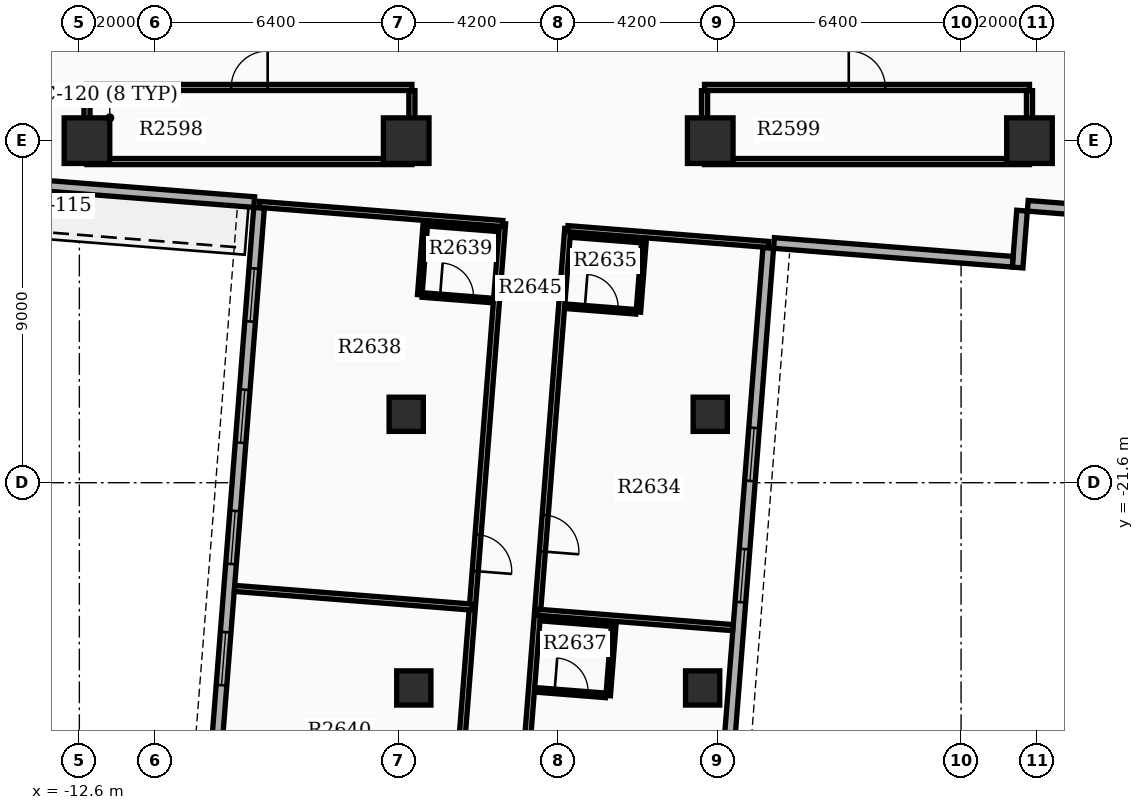
"""IFC4 building model, lengths in metres.
Left out: names, types, materials, properties, quantities, classifications, styles, units other than length and angle.
Written with IfcOpenShell. Run it as: python <this file> out.ifc"""

import sys

from ifc_helpers import new_model, si_unit, direction, frame, frame_2d, origin, origin_2d, place, context, subcontext, project, spatial, rectangle, extrude, element, fill, save


model = new_model("IFC4")
c1 = context("Model", 3, precision=1e-05, world=origin(), true_north=direction((0.0, 1.0)))
c2 = subcontext(c1, "Body", "Model", "MODEL_VIEW")
j1 = project(units=[si_unit("LENGTHUNIT", "METRE"), si_unit("PLANEANGLEUNIT", "RADIAN")], contexts=[c1])
p1 = place(None, origin())
s1 = spatial("IfcSite", under=j1, at=p1, CompositionType="ELEMENT")
p2 = place(p1, origin())
s2 = spatial("IfcBuilding", under=s1, at=p2, CompositionType="ELEMENT")
p3 = place(p2, frame((0.0, 0.0, 164.4)))
s3 = spatial("IfcBuildingStorey", under=s2, at=p3, CompositionType="ELEMENT", Elevation=164.4)
for number, where, z_axis, x_axis in (
    (1, (-12.4, -12.6, 0.0), (0.0, 0.0, 1.0), (1.0, 0.0, 0.0)),
    (2, (12.4, -12.6, 0.0), (0.0, 0.0, 1.0), (1.0, 0.0, 0.0)),
    (3, (-4.0, -12.6, 0.0), (0.0, 0.0, 1.0), (1.0, 0.0, 0.0)),
    (4, (4.0, -12.6, 0.0), (0.0, 0.0, 1.0), (1.0, 0.0, 0.0)),
):
    element("IfcColumn", number, at=place(p3, frame(where, z_axis=z_axis, x_axis=x_axis)), inside=s3, PredefinedType="COLUMN", context=c2, shape_type="SweptSolid", body=[
        extrude(rectangle(XDim=1.2, YDim=1.2, at=origin_2d()), origin(), (0.0, 0.0, 1.0), 3.9),
    ])
for number, where, z_axis, x_axis in (
    (5, (-4.0, -19.8, 0.0), (0.0, 0.0, 1.0), (1.0, 0.0, 0.0)),
    (6, (4.0, -19.8, 0.0), (0.0, 0.0, 1.0), (1.0, 0.0, 0.0)),
    (7, (-3.8, -27.0, 0.0), (0.0, 0.0, 1.0), (1.0, 0.0, 0.0)),
    (8, (3.8, -27.0, 0.0), (0.0, 0.0, 1.0), (1.0, 0.0, 0.0)),
):
    element("IfcColumn", number, at=place(p3, frame(where, z_axis=z_axis, x_axis=x_axis)), inside=s3, PredefinedType="COLUMN", context=c2, shape_type="SweptSolid", body=[
        extrude(rectangle(XDim=0.9, YDim=0.9, at=origin_2d()), origin(), (0.0, 0.0, 1.0), 3.9),
    ])
p4 = place(p3, frame((-7.872, -14.367, 0.0), z_axis=(0.0, 0.0, 1.0), x_axis=(-0.078452802979, -0.996917828963, 0.0)))
e9 = element("IfcWall", 9, at=p4, inside=s3, PredefinedType="STANDARD", context=c2, shape_type="SweptSolid", body=[
    extrude(rectangle(XDim=20.1, YDim=0.28, at=frame_2d((10.05, 0.0))), origin(), (0.0, 0.0, 1.0), 2.97),
])
p5 = place(p4, frame((1.6, 0.0, 0.8)))
e10 = element("IfcOpeningElement", 10, at=p5, cuts=e9, PredefinedType="OPENING", context=c2, shape_type="SweptSolid", body=[
    extrude(rectangle(XDim=1.4, YDim=1.6, at=frame_2d((0.7, 0.8))), frame((0.0, 0.15, 0.0), z_axis=(0.0, -1.0, 0.0), x_axis=(1.0, 0.0, 0.0)), (0.0, 0.0, 1.0), 0.3),
])
p6 = place(p4, frame((4.8, 0.0, 0.8)))
e11 = element("IfcOpeningElement", 11, at=p6, cuts=e9, PredefinedType="OPENING", context=c2, shape_type="SweptSolid", body=[
    extrude(rectangle(XDim=1.4, YDim=1.6, at=frame_2d((0.7, 0.8))), frame((0.0, 0.15, 0.0), z_axis=(0.0, -1.0, 0.0), x_axis=(1.0, 0.0, 0.0)), (0.0, 0.0, 1.0), 0.3),
])
p7 = place(p4, frame((8.0, 0.0, 0.8)))
e12 = element("IfcOpeningElement", 12, at=p7, cuts=e9, PredefinedType="OPENING", context=c2, shape_type="SweptSolid", body=[
    extrude(rectangle(XDim=1.4, YDim=1.6, at=frame_2d((0.7, 0.8))), frame((0.0, 0.15, 0.0), z_axis=(0.0, -1.0, 0.0), x_axis=(1.0, 0.0, 0.0)), (0.0, 0.0, 1.0), 0.3),
])
p8 = place(p4, frame((11.2, 0.0, 0.8)))
e13 = element("IfcOpeningElement", 13, at=p8, cuts=e9, PredefinedType="OPENING", context=c2, shape_type="SweptSolid", body=[
    extrude(rectangle(XDim=1.4, YDim=1.6, at=frame_2d((0.7, 0.8))), frame((0.0, 0.15, 0.0), z_axis=(0.0, -1.0, 0.0), x_axis=(1.0, 0.0, 0.0)), (0.0, 0.0, 1.0), 0.3),
])
p9 = place(p3, frame((3.95, -35.459, 0.0), z_axis=(0.0, 0.0, 1.0), x_axis=(0.078452802979, 0.996917828963, 0.0)))
e14 = element("IfcWall", 14, at=p9, inside=s3, PredefinedType="STANDARD", context=c2, shape_type="SweptSolid", body=[
    extrude(rectangle(XDim=20.1, YDim=0.28, at=frame_2d((10.05, 0.0))), origin(), (0.0, 0.0, 1.0), 2.97),
])
p10 = place(p9, frame((1.6, 0.0, 0.8)))
e15 = element("IfcOpeningElement", 15, at=p10, cuts=e14, PredefinedType="OPENING", context=c2, shape_type="SweptSolid", body=[
    extrude(rectangle(XDim=1.4, YDim=1.6, at=frame_2d((0.7, 0.8))), frame((0.0, 0.15, 0.0), z_axis=(0.0, -1.0, 0.0), x_axis=(1.0, 0.0, 0.0)), (0.0, 0.0, 1.0), 0.3),
])
p11 = place(p9, frame((4.8, 0.0, 0.8)))
e16 = element("IfcOpeningElement", 16, at=p11, cuts=e14, PredefinedType="OPENING", context=c2, shape_type="SweptSolid", body=[
    extrude(rectangle(XDim=1.4, YDim=1.6, at=frame_2d((0.7, 0.8))), frame((0.0, 0.15, 0.0), z_axis=(0.0, -1.0, 0.0), x_axis=(1.0, 0.0, 0.0)), (0.0, 0.0, 1.0), 0.3),
])
p12 = place(p9, frame((10.75, 0.0, 0.8)))
e17 = element("IfcOpeningElement", 17, at=p12, cuts=e14, PredefinedType="OPENING", context=c2, shape_type="SweptSolid", body=[
    extrude(rectangle(XDim=1.4, YDim=1.6, at=frame_2d((0.7, 0.8))), frame((0.0, 0.15, 0.0), z_axis=(0.0, -1.0, 0.0), x_axis=(1.0, 0.0, 0.0)), (0.0, 0.0, 1.0), 0.3),
])
p13 = place(p9, frame((13.95, 0.0, 0.8)))
e18 = element("IfcOpeningElement", 18, at=p13, cuts=e14, PredefinedType="OPENING", context=c2, shape_type="SweptSolid", body=[
    extrude(rectangle(XDim=1.4, YDim=1.6, at=frame_2d((0.7, 0.8))), frame((0.0, 0.15, 0.0), z_axis=(0.0, -1.0, 0.0), x_axis=(1.0, 0.0, 0.0)), (0.0, 0.0, 1.0), 0.3),
])
p14 = place(p3, frame((-14.281, -13.722, 0.0), z_axis=(0.0, 0.0, 1.0), x_axis=(0.99691915642, -0.078435932851, 0.0)))
e19 = element("IfcWall", 19, at=p14, inside=s3, PredefinedType="STANDARD", context=c2, shape_type="SweptSolid", body=[
    extrude(rectangle(XDim=6.3, YDim=0.28, at=frame_2d((3.15, 0.0))), origin(), (0.0, 0.0, 1.0), 2.97),
])
p15 = place(p3, frame((13.571, -14.409, 0.0), z_axis=(0.0, 0.0, 1.0), x_axis=(-0.996918772, 0.078440818672, 0.0)))
e20 = element("IfcWall", 20, at=p15, inside=s3, PredefinedType="STANDARD", context=c2, shape_type="SweptSolid", body=[
    extrude(rectangle(XDim=1.22, YDim=0.28, at=frame_2d((0.61, 0.0))), origin(), (0.0, 0.0, 1.0), 2.97),
])
p16 = place(p3, frame((12.205, -14.442, 0.0), z_axis=(0.0, 0.0, 1.0), x_axis=(-0.078451338629, -0.9969179442, 0.0)))
e21 = element("IfcWall", 21, at=p16, inside=s3, PredefinedType="STANDARD", context=c2, shape_type="SweptSolid", body=[
    extrude(rectangle(XDim=1.5, YDim=0.28, at=frame_2d((0.75, 0.0))), origin(), (0.0, 0.0, 1.0), 2.97),
])
p17 = place(p3, frame((11.958, -15.787, 0.0), z_axis=(0.0, 0.0, 1.0), x_axis=(-0.996916125428, 0.078474447191, 0.0)))
e22 = element("IfcWall", 22, at=p17, inside=s3, PredefinedType="STANDARD", context=c2, shape_type="SweptSolid", body=[
    extrude(rectangle(XDim=6.3, YDim=0.28, at=frame_2d((3.15, 0.0))), origin(), (0.0, 0.0, 1.0), 2.97),
])
p18 = place(p3, frame((-12.4, -13.15, 0.0), z_axis=(0.0, 0.0, 1.0), x_axis=(1.0, 0.0, 0.0)))
e23 = element("IfcWall", 23, at=p18, inside=s3, PredefinedType="PARTITIONING", context=c2, shape_type="SweptSolid", body=[
    extrude(rectangle(XDim=8.55, YDim=0.16, at=frame_2d((4.275, 0.0))), origin(), (0.0, 0.0, 1.0), 2.96),
])
p19 = place(p3, frame((-12.4, -11.2, 0.0), z_axis=(0.0, 0.0, 1.0), x_axis=(1.0, 0.0, 0.0)))
e24 = element("IfcWall", 24, at=p19, inside=s3, PredefinedType="PARTITIONING", context=c2, shape_type="SweptSolid", body=[
    extrude(rectangle(XDim=8.55, YDim=0.16, at=frame_2d((4.275, 0.0))), origin(), (0.0, 0.0, 1.0), 2.96),
])
p20 = place(p19, frame((3.795, 0.0, 0.0)))
e25 = element("IfcOpeningElement", 25, at=p20, cuts=e24, PredefinedType="OPENING", context=c2, shape_type="SweptSolid", body=[
    extrude(rectangle(XDim=0.96, YDim=2.15, at=frame_2d((0.48, 1.075))), frame((0.0, 0.09, 0.0), z_axis=(0.0, -1.0, 0.0), x_axis=(1.0, 0.0, 0.0)), (0.0, 0.0, 1.0), 0.18),
])
for number, where, z_axis, x_axis in (
    (26, (-12.4, -13.065, 0.0), (0.0, 0.0, 1.0), (0.0, 1.0, 0.0)),
    (27, (-3.85, -13.065, 0.0), (0.0, 0.0, 1.0), (0.0, 1.0, 0.0)),
):
    element("IfcWall", number, at=place(p3, frame(where, z_axis=z_axis, x_axis=x_axis)), inside=s3, PredefinedType="PARTITIONING", context=c2, shape_type="SweptSolid", body=[
        extrude(rectangle(XDim=1.78, YDim=0.16, at=frame_2d((0.89, 0.0))), origin(), (0.0, 0.0, 1.0), 2.96),
    ])
p21 = place(p3, frame((3.85, -13.15, 0.0), z_axis=(0.0, 0.0, 1.0), x_axis=(1.0, 0.0, 0.0)))
e28 = element("IfcWall", 28, at=p21, inside=s3, PredefinedType="PARTITIONING", context=c2, shape_type="SweptSolid", body=[
    extrude(rectangle(XDim=8.55, YDim=0.16, at=frame_2d((4.275, 0.0))), origin(), (0.0, 0.0, 1.0), 2.96),
])
p22 = place(p3, frame((3.85, -11.2, 0.0), z_axis=(0.0, 0.0, 1.0), x_axis=(1.0, 0.0, 0.0)))
e29 = element("IfcWall", 29, at=p22, inside=s3, PredefinedType="PARTITIONING", context=c2, shape_type="SweptSolid", body=[
    extrude(rectangle(XDim=8.55, YDim=0.16, at=frame_2d((4.275, 0.0))), origin(), (0.0, 0.0, 1.0), 2.96),
])
p23 = place(p22, frame((3.795, 0.0, 0.0)))
e30 = element("IfcOpeningElement", 30, at=p23, cuts=e29, PredefinedType="OPENING", context=c2, shape_type="SweptSolid", body=[
    extrude(rectangle(XDim=0.96, YDim=2.15, at=frame_2d((0.48, 1.075))), frame((0.0, 0.09, 0.0), z_axis=(0.0, -1.0, 0.0), x_axis=(1.0, 0.0, 0.0)), (0.0, 0.0, 1.0), 0.18),
])
for number, where, z_axis, x_axis in (
    (31, (3.85, -13.065, 0.0), (0.0, 0.0, 1.0), (0.0, 1.0, 0.0)),
    (32, (12.4, -13.065, 0.0), (0.0, 0.0, 1.0), (0.0, 1.0, 0.0)),
):
    element("IfcWall", number, at=place(p3, frame(where, z_axis=z_axis, x_axis=x_axis)), inside=s3, PredefinedType="PARTITIONING", context=c2, shape_type="SweptSolid", body=[
        extrude(rectangle(XDim=1.78, YDim=0.16, at=frame_2d((0.89, 0.0))), origin(), (0.0, 0.0, 1.0), 2.96),
    ])
p24 = place(p3, frame((0.25, -14.916, 0.0), z_axis=(0.0, 0.0, 1.0), x_axis=(-0.078460461943, -0.996917226209, 0.0)))
e33 = element("IfcWall", 33, at=p24, inside=s3, PredefinedType="PARTITIONING", context=c2, shape_type="SweptSolid", body=[
    extrude(rectangle(XDim=20.182, YDim=0.16, at=frame_2d((10.091, 0.0))), origin(), (0.0, 0.0, 1.0), 2.96),
])
p25 = place(p24, frame((7.559, 0.0, 0.0)))
e34 = element("IfcOpeningElement", 34, at=p25, cuts=e33, PredefinedType="OPENING", context=c2, shape_type="SweptSolid", body=[
    extrude(rectangle(XDim=0.96, YDim=2.15, at=frame_2d((0.48, 1.075))), frame((0.0, 0.09, 0.0), z_axis=(0.0, -1.0, 0.0), x_axis=(1.0, 0.0, 0.0)), (0.0, 0.0, 1.0), 0.18),
])
p26 = place(p24, frame((18.93, 0.0, 0.0)))
e35 = element("IfcOpeningElement", 35, at=p26, cuts=e33, PredefinedType="OPENING", context=c2, shape_type="SweptSolid", body=[
    extrude(rectangle(XDim=0.96, YDim=2.15, at=frame_2d((0.48, 1.075))), frame((0.0, 0.09, 0.0), z_axis=(0.0, -1.0, 0.0), x_axis=(1.0, 0.0, 0.0)), (0.0, 0.0, 1.0), 0.18),
])
p27 = place(p3, frame((0.25, -14.916, 0.0), z_axis=(0.0, 0.0, 1.0), x_axis=(0.996914675376, -0.07849286604, 0.0)))
e36 = element("IfcWall", 36, at=p27, inside=s3, PredefinedType="PARTITIONING", context=c2, shape_type="SweptSolid", body=[
    extrude(rectangle(XDim=5.3, YDim=0.16, at=frame_2d((2.65, 0.0))), origin(), (0.0, 0.0, 1.0), 2.96),
])
p28 = place(p3, frame((-0.544, -25.008, 0.0), z_axis=(0.0, 0.0, 1.0), x_axis=(0.99691602815, -0.078475682969, 0.0)))
e37 = element("IfcWall", 37, at=p28, inside=s3, PredefinedType="PARTITIONING", context=c2, shape_type="SweptSolid", body=[
    extrude(rectangle(XDim=5.152, YDim=0.16, at=frame_2d((2.576, 0.0))), origin(), (0.0, 0.0, 1.0), 2.96),
])
p29 = place(p3, frame((0.23, -16.96, 0.0), z_axis=(0.0, 0.0, 1.0), x_axis=(0.996916400774, -0.0784709492, 0.0)))
e38 = element("IfcWall", 38, at=p29, inside=s3, PredefinedType="PARTITIONING", context=c2, shape_type="SweptSolid", body=[
    extrude(rectangle(XDim=1.82, YDim=0.12, at=frame_2d((0.91, 0.0))), origin(), (0.0, 0.0, 1.0), 2.96),
])
p30 = place(p29, frame((0.47, 0.0, 0.0)))
e39 = element("IfcOpeningElement", 39, at=p30, cuts=e38, PredefinedType="OPENING", context=c2, shape_type="SweptSolid", body=[
    extrude(rectangle(XDim=0.88, YDim=2.1, at=frame_2d((0.44, 1.05))), frame((0.0, 0.07, 0.0), z_axis=(0.0, -1.0, 0.0), x_axis=(1.0, 0.0, 0.0)), (0.0, 0.0, 1.0), 0.14),
])
p31 = place(p3, frame((0.377, -15.086, 0.0), z_axis=(0.0, 0.0, 1.0), x_axis=(0.996916400774, -0.0784709492, 0.0)))
e40 = element("IfcWall", 40, at=p31, inside=s3, PredefinedType="PARTITIONING", context=c2, shape_type="SweptSolid", body=[
    extrude(rectangle(XDim=1.82, YDim=0.12, at=frame_2d((0.91, 0.0))), origin(), (0.0, 0.0, 1.0), 2.96),
])
p32 = place(p3, frame((2.257, -15.234, 0.0), z_axis=(0.0, 0.0, 1.0), x_axis=(-0.07843418698, -0.996919293781, 0.0)))
e41 = element("IfcWall", 41, at=p32, inside=s3, PredefinedType="PARTITIONING", context=c2, shape_type="SweptSolid", body=[
    extrude(rectangle(XDim=1.88, YDim=0.12, at=frame_2d((0.94, 0.0))), origin(), (0.0, 0.0, 1.0), 2.96),
])
p33 = place(p3, frame((-0.564, -27.053, 0.0), z_axis=(0.0, 0.0, 1.0), x_axis=(0.996915574626, -0.078481444107, 0.0)))
e42 = element("IfcWall", 42, at=p33, inside=s3, PredefinedType="PARTITIONING", context=c2, shape_type="SweptSolid", body=[
    extrude(rectangle(XDim=1.82, YDim=0.12, at=frame_2d((0.91, 0.0))), origin(), (0.0, 0.0, 1.0), 2.96),
])
p34 = place(p33, frame((0.47, 0.0, 0.0)))
e43 = element("IfcOpeningElement", 43, at=p34, cuts=e42, PredefinedType="OPENING", context=c2, shape_type="SweptSolid", body=[
    extrude(rectangle(XDim=0.88, YDim=2.1, at=frame_2d((0.44, 1.05))), frame((0.0, 0.07, 0.0), z_axis=(0.0, -1.0, 0.0), x_axis=(1.0, 0.0, 0.0)), (0.0, 0.0, 1.0), 0.14),
])
p35 = place(p3, frame((-0.417, -25.179, 0.0), z_axis=(0.0, 0.0, 1.0), x_axis=(0.996916400774, -0.0784709492, 0.0)))
e44 = element("IfcWall", 44, at=p35, inside=s3, PredefinedType="PARTITIONING", context=c2, shape_type="SweptSolid", body=[
    extrude(rectangle(XDim=1.82, YDim=0.12, at=frame_2d((0.91, 0.0))), origin(), (0.0, 0.0, 1.0), 2.96),
])
p36 = place(p3, frame((1.462, -25.327, 0.0), z_axis=(0.0, 0.0, 1.0), x_axis=(-0.078444342213, -0.99691849475, 0.0)))
e45 = element("IfcWall", 45, at=p36, inside=s3, PredefinedType="PARTITIONING", context=c2, shape_type="SweptSolid", body=[
    extrude(rectangle(XDim=1.88, YDim=0.12, at=frame_2d((0.94, 0.0))), origin(), (0.0, 0.0, 1.0), 2.96),
])
p37 = place(p3, frame((-1.464, -14.781, 0.0), z_axis=(0.0, 0.0, 1.0), x_axis=(-0.078461408156, -0.996917151738, 0.0)))
e46 = element("IfcWall", 46, at=p37, inside=s3, PredefinedType="PARTITIONING", context=c2, shape_type="SweptSolid", body=[
    extrude(rectangle(XDim=20.182, YDim=0.16, at=frame_2d((10.091, 0.0))), origin(), (0.0, 0.0, 1.0), 2.96),
])
p38 = place(p37, frame((8.212, 0.0, 0.0)))
e47 = element("IfcOpeningElement", 47, at=p38, cuts=e46, PredefinedType="OPENING", context=c2, shape_type="SweptSolid", body=[
    extrude(rectangle(XDim=0.96, YDim=2.15, at=frame_2d((0.48, 1.075))), frame((0.0, 0.09, 0.0), z_axis=(0.0, -1.0, 0.0), x_axis=(1.0, 0.0, 0.0)), (0.0, 0.0, 1.0), 0.18),
])
p39 = place(p37, frame((16.261, 0.0, 0.0)))
e48 = element("IfcOpeningElement", 48, at=p39, cuts=e46, PredefinedType="OPENING", context=c2, shape_type="SweptSolid", body=[
    extrude(rectangle(XDim=0.96, YDim=2.15, at=frame_2d((0.48, 1.075))), frame((0.0, 0.09, 0.0), z_axis=(0.0, -1.0, 0.0), x_axis=(1.0, 0.0, 0.0)), (0.0, 0.0, 1.0), 0.18),
])
p40 = place(p3, frame((-1.464, -14.781, 0.0), z_axis=(0.0, 0.0, 1.0), x_axis=(-0.996918059277, 0.07844987627, 0.0)))
e49 = element("IfcWall", 49, at=p40, inside=s3, PredefinedType="PARTITIONING", context=c2, shape_type="SweptSolid", body=[
    extrude(rectangle(XDim=6.42, YDim=0.16, at=frame_2d((3.21, 0.0))), origin(), (0.0, 0.0, 1.0), 2.96),
])
p41 = place(p3, frame((-2.259, -24.874, 0.0), z_axis=(0.0, 0.0, 1.0), x_axis=(-0.996916205331, 0.078473432117, 0.0)))
e50 = element("IfcWall", 50, at=p41, inside=s3, PredefinedType="PARTITIONING", context=c2, shape_type="SweptSolid", body=[
    extrude(rectangle(XDim=6.272, YDim=0.16, at=frame_2d((3.136, 0.0))), origin(), (0.0, 0.0, 1.0), 2.96),
])
p42 = place(p3, frame((-3.578, -16.661, 0.0), z_axis=(0.0, 0.0, 1.0), x_axis=(0.996915574626, -0.078481444107, 0.0)))
e51 = element("IfcWall", 51, at=p42, inside=s3, PredefinedType="PARTITIONING", context=c2, shape_type="SweptSolid", body=[
    extrude(rectangle(XDim=1.82, YDim=0.12, at=frame_2d((0.91, 0.0))), origin(), (0.0, 0.0, 1.0), 2.96),
])
p43 = place(p42, frame((0.47, 0.0, 0.0)))
e52 = element("IfcOpeningElement", 52, at=p43, cuts=e51, PredefinedType="OPENING", context=c2, shape_type="SweptSolid", body=[
    extrude(rectangle(XDim=0.88, YDim=2.1, at=frame_2d((0.44, 1.05))), frame((0.0, 0.07, 0.0), z_axis=(0.0, -1.0, 0.0), x_axis=(1.0, 0.0, 0.0)), (0.0, 0.0, 1.0), 0.14),
])
p44 = place(p3, frame((-3.431, -14.786, 0.0), z_axis=(0.0, 0.0, 1.0), x_axis=(0.996916400774, -0.0784709492, 0.0)))
e53 = element("IfcWall", 53, at=p44, inside=s3, PredefinedType="PARTITIONING", context=c2, shape_type="SweptSolid", body=[
    extrude(rectangle(XDim=1.82, YDim=0.12, at=frame_2d((0.91, 0.0))), origin(), (0.0, 0.0, 1.0), 2.96),
])
p45 = place(p3, frame((-3.496, -14.781, 0.0), z_axis=(0.0, 0.0, 1.0), x_axis=(-0.07843418698, -0.996919293781, 0.0)))
e54 = element("IfcWall", 54, at=p45, inside=s3, PredefinedType="PARTITIONING", context=c2, shape_type="SweptSolid", body=[
    extrude(rectangle(XDim=1.88, YDim=0.12, at=frame_2d((0.94, 0.0))), origin(), (0.0, 0.0, 1.0), 2.96),
])
p46 = place(p5, origin())
e55 = element("IfcWindow", 55, at=p46, inside=s3, PartitioningType="SINGLE_PANEL", PredefinedType="WINDOW", context=c2, shape_type="SweptSolid", body=[
    extrude(rectangle(XDim=1.4, YDim=1.6, at=frame_2d((0.7, 0.8))), frame((0.0, 0.03, 0.0), z_axis=(0.0, -1.0, 0.0), x_axis=(1.0, 0.0, 0.0)), (0.0, 0.0, 1.0), 0.06),
])
fill(e10, e55)
p47 = place(p6, origin())
e56 = element("IfcWindow", 56, at=p47, inside=s3, PartitioningType="SINGLE_PANEL", PredefinedType="WINDOW", context=c2, shape_type="SweptSolid", body=[
    extrude(rectangle(XDim=1.4, YDim=1.6, at=frame_2d((0.7, 0.8))), frame((0.0, 0.03, 0.0), z_axis=(0.0, -1.0, 0.0), x_axis=(1.0, 0.0, 0.0)), (0.0, 0.0, 1.0), 0.06),
])
fill(e11, e56)
p48 = place(p7, origin())
e57 = element("IfcWindow", 57, at=p48, inside=s3, PartitioningType="SINGLE_PANEL", PredefinedType="WINDOW", context=c2, shape_type="SweptSolid", body=[
    extrude(rectangle(XDim=1.4, YDim=1.6, at=frame_2d((0.7, 0.8))), frame((0.0, 0.03, 0.0), z_axis=(0.0, -1.0, 0.0), x_axis=(1.0, 0.0, 0.0)), (0.0, 0.0, 1.0), 0.06),
])
fill(e12, e57)
p49 = place(p8, origin())
e58 = element("IfcWindow", 58, at=p49, inside=s3, PartitioningType="SINGLE_PANEL", PredefinedType="WINDOW", context=c2, shape_type="SweptSolid", body=[
    extrude(rectangle(XDim=1.4, YDim=1.6, at=frame_2d((0.7, 0.8))), frame((0.0, 0.03, 0.0), z_axis=(0.0, -1.0, 0.0), x_axis=(1.0, 0.0, 0.0)), (0.0, 0.0, 1.0), 0.06),
])
fill(e13, e58)
p50 = place(p12, origin())
e59 = element("IfcWindow", 59, at=p50, inside=s3, PartitioningType="SINGLE_PANEL", PredefinedType="WINDOW", context=c2, shape_type="SweptSolid", body=[
    extrude(rectangle(XDim=1.4, YDim=1.6, at=frame_2d((0.7, 0.8))), frame((0.0, 0.03, 0.0), z_axis=(0.0, -1.0, 0.0), x_axis=(1.0, 0.0, 0.0)), (0.0, 0.0, 1.0), 0.06),
])
fill(e17, e59)
p51 = place(p13, origin())
e60 = element("IfcWindow", 60, at=p51, inside=s3, PartitioningType="SINGLE_PANEL", PredefinedType="WINDOW", context=c2, shape_type="SweptSolid", body=[
    extrude(rectangle(XDim=1.4, YDim=1.6, at=frame_2d((0.7, 0.8))), frame((0.0, 0.03, 0.0), z_axis=(0.0, -1.0, 0.0), x_axis=(1.0, 0.0, 0.0)), (0.0, 0.0, 1.0), 0.06),
])
fill(e18, e60)
p52 = place(p20, origin())
e61 = element("IfcDoor", 61, at=p52, inside=s3, OperationType="SINGLE_SWING_RIGHT", PredefinedType="DOOR", context=c2, shape_type="SweptSolid", body=[
    extrude(rectangle(XDim=0.96, YDim=2.15, at=frame_2d((0.48, 1.075))), frame((0.0, 0.025, 0.0), z_axis=(0.0, -1.0, 0.0), x_axis=(1.0, 0.0, 0.0)), (0.0, 0.0, 1.0), 0.05),
])
fill(e25, e61)
p53 = place(p23, origin())
e62 = element("IfcDoor", 62, at=p53, inside=s3, OperationType="SINGLE_SWING_LEFT", PredefinedType="DOOR", context=c2, shape_type="SweptSolid", body=[
    extrude(rectangle(XDim=0.96, YDim=2.15, at=frame_2d((0.48, 1.075))), frame((0.0, 0.025, 0.0), z_axis=(0.0, -1.0, 0.0), x_axis=(1.0, 0.0, 0.0)), (0.0, 0.0, 1.0), 0.05),
])
fill(e30, e62)
p54 = place(p25, origin())
e63 = element("IfcDoor", 63, at=p54, inside=s3, OperationType="SINGLE_SWING_RIGHT", PredefinedType="DOOR", context=c2, shape_type="SweptSolid", body=[
    extrude(rectangle(XDim=0.96, YDim=2.15, at=frame_2d((0.48, 1.075))), frame((0.0, 0.025, 0.0), z_axis=(0.0, -1.0, 0.0), x_axis=(1.0, 0.0, 0.0)), (0.0, 0.0, 1.0), 0.05),
])
fill(e34, e63)
p55 = place(p30, origin())
e64 = element("IfcDoor", 64, at=p55, inside=s3, OperationType="SINGLE_SWING_LEFT", PredefinedType="DOOR", context=c2, shape_type="SweptSolid", body=[
    extrude(rectangle(XDim=0.88, YDim=2.1, at=frame_2d((0.44, 1.05))), frame((0.0, 0.025, 0.0), z_axis=(0.0, -1.0, 0.0), x_axis=(1.0, 0.0, 0.0)), (0.0, 0.0, 1.0), 0.05),
])
fill(e39, e64)
p56 = place(p34, origin())
e65 = element("IfcDoor", 65, at=p56, inside=s3, OperationType="SINGLE_SWING_LEFT", PredefinedType="DOOR", context=c2, shape_type="SweptSolid", body=[
    extrude(rectangle(XDim=0.88, YDim=2.1, at=frame_2d((0.44, 1.05))), frame((0.0, 0.025, 0.0), z_axis=(0.0, -1.0, 0.0), x_axis=(1.0, 0.0, 0.0)), (0.0, 0.0, 1.0), 0.05),
])
fill(e43, e65)
p57 = place(p38, origin())
e66 = element("IfcDoor", 66, at=p57, inside=s3, OperationType="SINGLE_SWING_RIGHT", PredefinedType="DOOR", context=c2, shape_type="SweptSolid", body=[
    extrude(rectangle(XDim=0.96, YDim=2.15, at=frame_2d((0.48, 1.075))), frame((0.0, 0.025, 0.0), z_axis=(0.0, -1.0, 0.0), x_axis=(1.0, 0.0, 0.0)), (0.0, 0.0, 1.0), 0.05),
])
fill(e47, e66)
p58 = place(p43, origin())
e67 = element("IfcDoor", 67, at=p58, inside=s3, OperationType="SINGLE_SWING_LEFT", PredefinedType="DOOR", context=c2, shape_type="SweptSolid", body=[
    extrude(rectangle(XDim=0.88, YDim=2.1, at=frame_2d((0.44, 1.05))), frame((0.0, 0.025, 0.0), z_axis=(0.0, -1.0, 0.0), x_axis=(1.0, 0.0, 0.0)), (0.0, 0.0, 1.0), 0.05),
])
fill(e52, e67)
save(model, sys.argv[1])
